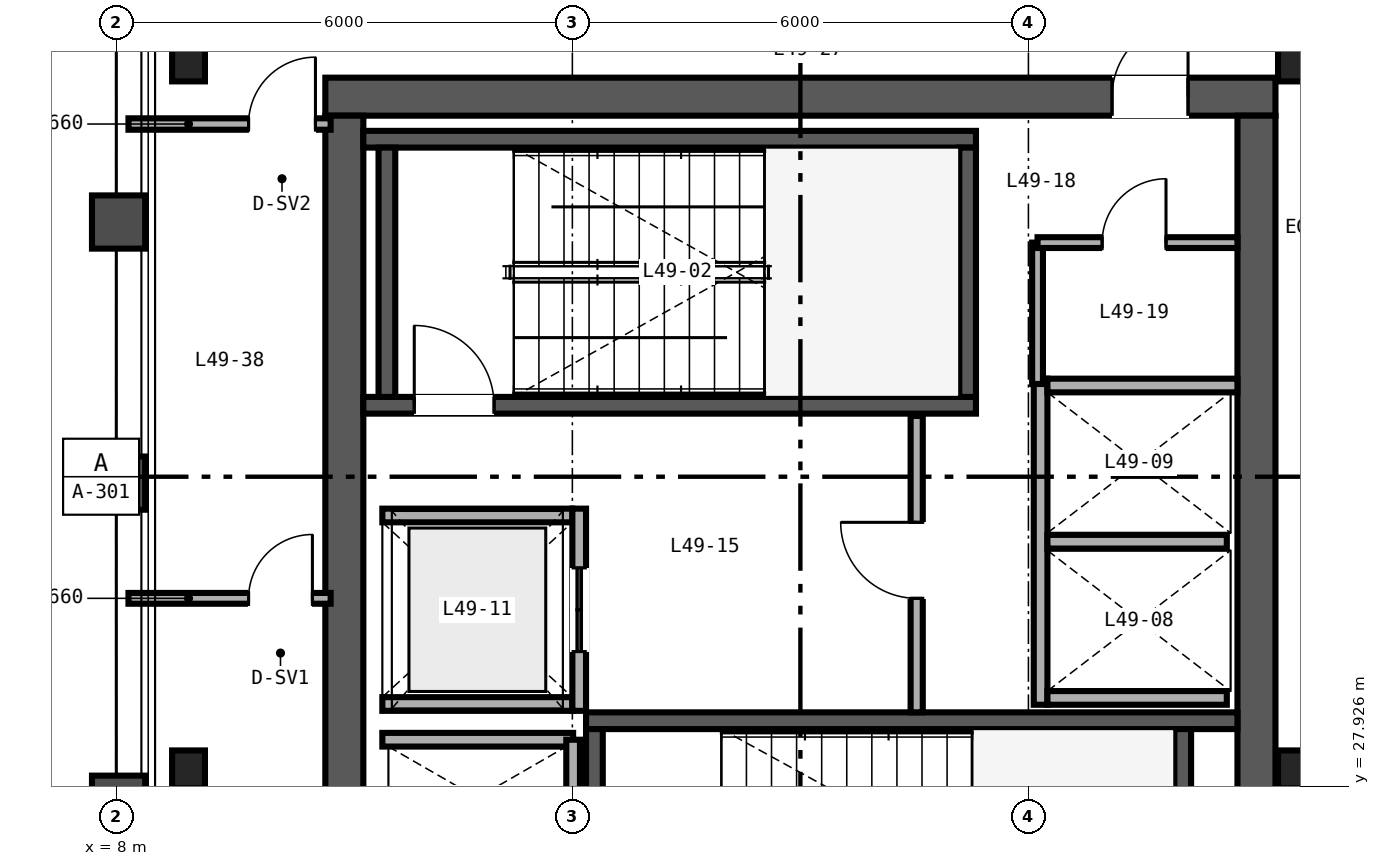
"""IFC4 building model, lengths in metres.
Left out: names, types, materials, properties, quantities, classifications, styles, units other than length and angle.
Written with IfcOpenShell. Run it as: python <this file> out.ifc"""

import sys

from ifc_helpers import new_model, si_unit, direction, frame, frame_2d, origin, origin_2d, place, context, subcontext, project, spatial, rectangle, i_section, extrude, source, transform, mapped, element, fill, save


model = new_model("IFC4")
c1 = context("Model", 3, precision=1e-05, world=origin(), true_north=direction((0.0, 1.0)))
c2 = subcontext(c1, "Body", "Model", "MODEL_VIEW")
j1 = project(units=[si_unit("LENGTHUNIT", "METRE"), si_unit("PLANEANGLEUNIT", "RADIAN")], contexts=[c1])
p1 = place(None, origin())
s1 = spatial("IfcSite", under=j1, at=p1, CompositionType="ELEMENT")
p2 = place(p1, origin())
s2 = spatial("IfcBuilding", under=s1, at=p2, CompositionType="ELEMENT")
p3 = place(p2, frame((0.0, 0.0, 195.6)))
s3 = spatial("IfcBuildingStorey", under=s2, at=p3, CompositionType="ELEMENT", Elevation=195.6)
p4 = place(p3, frame((10.75, 37.0, 0.0), z_axis=(0.0, 0.0, 1.0), x_axis=(1.0, 0.0, 0.0)))
e1 = element("IfcWall", 1, at=p4, inside=s3, PredefinedType="SHEAR", context=c2, shape_type="SweptSolid", body=[
    extrude(rectangle(XDim=12.5, YDim=0.5, at=frame_2d((6.25, 0.0))), origin(), (0.0, 0.0, 1.0), 3.37),
])
p5 = place(p4, frame((10.35, 0.0, 0.0)))
e2 = element("IfcOpeningElement", 2, at=p5, cuts=e1, PredefinedType="OPENING", context=c2, shape_type="SweptSolid", body=[
    extrude(rectangle(XDim=1.0, YDim=2.15, at=frame_2d((0.5, 1.075))), frame((0.0, 0.26, 0.0), z_axis=(0.0, -1.0, 0.0), x_axis=(1.0, 0.0, 0.0)), (0.0, 0.0, 1.0), 0.52),
])
for number, where, z_axis, x_axis in (
    (3, (11.0, 15.25, 0.0), (0.0, 0.0, 1.0), (0.0, 1.0, 0.0)),
    (4, (23.0, 15.25, 0.0), (0.0, 0.0, 1.0), (0.0, 1.0, 0.0)),
):
    element("IfcWall", number, at=place(p3, frame(where, z_axis=z_axis, x_axis=x_axis)), inside=s3, PredefinedType="SHEAR", context=c2, shape_type="SweptSolid", body=[
        extrude(rectangle(XDim=21.5, YDim=0.5, at=frame_2d((10.75, 0.0))), origin(), (0.0, 0.0, 1.0), 3.37),
    ])
p6 = place(p3, frame((11.25, 32.94, 0.0), z_axis=(0.0, 0.0, 1.0), x_axis=(1.0, 0.0, 0.0)))
e5 = element("IfcWall", 5, at=p6, inside=s3, PredefinedType="SHEAR", context=c2, shape_type="SweptSolid", body=[
    extrude(rectangle(XDim=8.06, YDim=0.22, at=frame_2d((4.03, 0.0))), origin(), (0.0, 0.0, 1.0), 3.4),
])
p7 = place(p6, frame((0.67, 0.0, 0.0)))
e6 = element("IfcOpeningElement", 6, at=p7, cuts=e5, PredefinedType="OPENING", context=c2, shape_type="SweptSolid", body=[
    extrude(rectangle(XDim=1.05, YDim=2.15, at=frame_2d((0.525, 1.075))), frame((0.0, 0.12, 0.0), z_axis=(0.0, -1.0, 0.0), x_axis=(1.0, 0.0, 0.0)), (0.0, 0.0, 1.0), 0.24),
])
p8 = place(p3, frame((11.25, 36.44, 0.0), z_axis=(0.0, 0.0, 1.0), x_axis=(1.0, 0.0, 0.0)))
e7 = element("IfcWall", 7, at=p8, inside=s3, PredefinedType="SHEAR", context=c2, shape_type="SweptSolid", body=[
    extrude(rectangle(XDim=8.06, YDim=0.22, at=frame_2d((4.03, 0.0))), origin(), (0.0, 0.0, 1.0), 3.4),
])
for number, where, z_axis, x_axis in (
    (8, (11.56, 33.05, 0.0), (0.0, 0.0, 1.0), (0.0, 1.0, 0.0)),
    (9, (19.2, 33.05, 0.0), (0.0, 0.0, 1.0), (0.0, 1.0, 0.0)),
):
    element("IfcWall", number, at=place(p3, frame(where, z_axis=z_axis, x_axis=x_axis)), inside=s3, PredefinedType="SHEAR", context=c2, shape_type="SweptSolid", body=[
        extrude(rectangle(XDim=3.28, YDim=0.22, at=frame_2d((1.64, 0.0))), origin(), (0.0, 0.0, 1.0), 3.4),
    ])
p9 = place(p3, frame((14.18, 28.79, 0.0), z_axis=(0.0, 0.0, 1.0), x_axis=(1.0, 0.0, 0.0)))
e10 = element("IfcWall", 10, at=p9, inside=s3, PredefinedType="SHEAR", context=c2, shape_type="SweptSolid", body=[
    extrude(rectangle(XDim=8.57, YDim=0.22, at=frame_2d((4.285, 0.0))), origin(), (0.0, 0.0, 1.0), 3.4),
])
for number, where, z_axis, x_axis in (
    (11, (14.29, 25.4, 0.0), (0.0, 0.0, 1.0), (0.0, 1.0, 0.0)),
    (12, (22.03, 25.4, 0.0), (0.0, 0.0, 1.0), (0.0, 1.0, 0.0)),
):
    element("IfcWall", number, at=place(p3, frame(where, z_axis=z_axis, x_axis=x_axis)), inside=s3, PredefinedType="SHEAR", context=c2, shape_type="SweptSolid", body=[
        extrude(rectangle(XDim=3.28, YDim=0.22, at=frame_2d((1.64, 0.0))), origin(), (0.0, 0.0, 1.0), 3.4),
    ])
m1 = source(origin(), c2, "Body", "SweptSolid", [
    extrude(i_section(OverallWidth=0.432, OverallDepth=0.498, WebThickness=0.056, FlangeThickness=0.089, FilletRadius=0.025, at=origin_2d()), origin(), (0.0, 0.0, 1.0), 3.37),
])
for number, where, z_axis, x_axis in (
    (13, (8.95, 28.15, 0.0), (0.0, 0.0, 1.0), (1.0, 0.0, 0.0)),
    (14, (23.5, 28.15, 0.0), (0.0, 0.0, 1.0), (1.0, 0.0, 0.0)),
    (15, (8.95, 37.45, 0.0), (0.0, 0.0, 1.0), (1.0, 0.0, 0.0)),
    (16, (23.5, 37.45, 0.0), (0.0, 0.0, 1.0), (1.0, 0.0, 0.0)),
):
    element("IfcColumn", number, at=place(p3, frame(where, z_axis=z_axis, x_axis=x_axis)), inside=s3, PredefinedType="COLUMN", context=c2, shape_type="MappedRepresentation", body=[
        mapped(m1, transform((0.0, 0.0, 0.0), scale=1.0)),
    ])
p10 = place(p3, frame((20.16, 29.0, 0.0), z_axis=(0.0, 0.0, 1.0), x_axis=(0.0, 1.0, 0.0)))
e17 = element("IfcWall", 17, at=p10, inside=s3, PredefinedType="SOLIDWALL", context=c2, shape_type="SweptSolid", body=[
    extrude(rectangle(XDim=4.29, YDim=0.18, at=frame_2d((2.145, 0.0))), origin(), (0.0, 0.0, 1.0), 3.37),
])
p11 = place(p3, frame((20.25, 29.09, 0.0), z_axis=(0.0, 0.0, 1.0), x_axis=(1.0, 0.0, 0.0)))
e18 = element("IfcWall", 18, at=p11, inside=s3, PredefinedType="SOLIDWALL", context=c2, shape_type="SweptSolid", body=[
    extrude(rectangle(XDim=2.36, YDim=0.18, at=frame_2d((1.18, 0.0))), origin(), (0.0, 0.0, 1.0), 3.37),
])
p12 = place(p3, frame((20.25, 33.2, 0.0), z_axis=(0.0, 0.0, 1.0), x_axis=(1.0, 0.0, 0.0)))
e19 = element("IfcWall", 19, at=p12, inside=s3, PredefinedType="SOLIDWALL", context=c2, shape_type="SweptSolid", body=[
    extrude(rectangle(XDim=2.5, YDim=0.18, at=frame_2d((1.25, 0.0))), origin(), (0.0, 0.0, 1.0), 3.37),
])
p13 = place(p3, frame((20.25, 31.145, 0.0), z_axis=(0.0, 0.0, 1.0), x_axis=(1.0, 0.0, 0.0)))
e20 = element("IfcWall", 20, at=p13, inside=s3, PredefinedType="SOLIDWALL", context=c2, shape_type="SweptSolid", body=[
    extrude(rectangle(XDim=2.36, YDim=0.18, at=frame_2d((1.18, 0.0))), origin(), (0.0, 0.0, 1.0), 3.37),
])
for number, where, z_axis, x_axis in (
    (21, (11.5, 29.01, 0.0), (0.0, 0.0, 1.0), (1.0, 0.0, 0.0)),
    (22, (11.5, 31.49, 0.0), (0.0, 0.0, 1.0), (1.0, 0.0, 0.0)),
):
    element("IfcWall", number, at=place(p3, frame(where, z_axis=z_axis, x_axis=x_axis)), inside=s3, PredefinedType="SOLIDWALL", context=c2, shape_type="SweptSolid", body=[
        extrude(rectangle(XDim=2.5, YDim=0.18, at=frame_2d((1.25, 0.0))), origin(), (0.0, 0.0, 1.0), 3.37),
    ])
p14 = place(p3, frame((14.09, 28.92, 0.0), z_axis=(0.0, 0.0, 1.0), x_axis=(0.0, 1.0, 0.0)))
e23 = element("IfcWall", 23, at=p14, inside=s3, PredefinedType="SOLIDWALL", context=c2, shape_type="SweptSolid", body=[
    extrude(rectangle(XDim=2.66, YDim=0.18, at=frame_2d((1.33, 0.0))), origin(), (0.0, 0.0, 1.0), 3.37),
])
p15 = place(p14, frame((0.78, 0.0, 0.0)))
e24 = element("IfcOpeningElement", 24, at=p15, cuts=e23, PredefinedType="OPENING", context=c2, shape_type="SweptSolid", body=[
    extrude(rectangle(XDim=1.1, YDim=2.2, at=frame_2d((0.55, 1.1))), frame((0.0, 0.1, 0.0), z_axis=(0.0, -1.0, 0.0), x_axis=(1.0, 0.0, 0.0)), (0.0, 0.0, 1.0), 0.2),
])
p16 = place(p3, frame((11.5, 28.54, 0.0), z_axis=(0.0, 0.0, 1.0), x_axis=(1.0, 0.0, 0.0)))
e25 = element("IfcWall", 25, at=p16, inside=s3, PredefinedType="SOLIDWALL", context=c2, shape_type="SweptSolid", body=[
    extrude(rectangle(XDim=2.51, YDim=0.18, at=frame_2d((1.255, 0.0))), origin(), (0.0, 0.0, 1.0), 3.37),
])
p17 = place(p3, frame((14.01, 25.46, 0.0), z_axis=(0.0, 0.0, 1.0), x_axis=(0.0, 1.0, 0.0)))
e26 = element("IfcWall", 26, at=p17, inside=s3, PredefinedType="SOLIDWALL", context=c2, shape_type="SweptSolid", body=[
    extrude(rectangle(XDim=3.08, YDim=0.18, at=frame_2d((1.54, 0.0))), origin(), (0.0, 0.0, 1.0), 3.37),
])
p18 = place(p3, frame((18.53, 28.9, 0.0), z_axis=(0.0, 0.0, 1.0), x_axis=(0.0, 1.0, 0.0)))
e27 = element("IfcWall", 27, at=p18, inside=s3, PredefinedType="PARTITIONING", context=c2, shape_type="SweptSolid", body=[
    extrude(rectangle(XDim=3.9, YDim=0.16, at=frame_2d((1.95, 0.0))), origin(), (0.0, 0.0, 1.0), 3.37),
])
p19 = place(p18, frame((1.5, 0.0, 0.0)))
e28 = element("IfcOpeningElement", 28, at=p19, cuts=e27, PredefinedType="OPENING", context=c2, shape_type="SweptSolid", body=[
    extrude(rectangle(XDim=1.0, YDim=2.15, at=frame_2d((0.5, 1.075))), frame((0.0, 0.09, 0.0), z_axis=(0.0, -1.0, 0.0), x_axis=(1.0, 0.0, 0.0)), (0.0, 0.0, 1.0), 0.18),
])
p20 = place(p3, frame((20.12, 33.22, 0.0), z_axis=(0.0, 0.0, 1.0), x_axis=(0.0, 1.0, 0.0)))
e29 = element("IfcWall", 29, at=p20, inside=s3, PredefinedType="PARTITIONING", context=c2, shape_type="SweptSolid", body=[
    extrude(rectangle(XDim=1.86, YDim=0.142, at=frame_2d((0.93, 0.0))), origin(), (0.0, 0.0, 1.0), 3.37),
])
p21 = place(p3, frame((20.12, 35.08, 0.0), z_axis=(0.0, 0.0, 1.0), x_axis=(1.0, 0.0, 0.0)))
e30 = element("IfcWall", 30, at=p21, inside=s3, PredefinedType="PARTITIONING", context=c2, shape_type="SweptSolid", body=[
    extrude(rectangle(XDim=2.63, YDim=0.142, at=frame_2d((1.315, 0.0))), origin(), (0.0, 0.0, 1.0), 3.37),
])
p22 = place(p21, frame((0.85, 0.0, 0.0)))
e31 = element("IfcOpeningElement", 31, at=p22, cuts=e30, PredefinedType="OPENING", context=c2, shape_type="SweptSolid", body=[
    extrude(rectangle(XDim=0.84, YDim=2.1, at=frame_2d((0.42, 1.05))), frame((0.0, 0.081, 0.0), z_axis=(0.0, -1.0, 0.0), x_axis=(1.0, 0.0, 0.0)), (0.0, 0.0, 1.0), 0.162),
])
p23 = place(p3, frame((8.16, 36.64, 0.0), z_axis=(0.0, 0.0, 1.0), x_axis=(1.0, 0.0, 0.0)))
e32 = element("IfcWall", 32, at=p23, inside=s3, PredefinedType="PARTITIONING", context=c2, shape_type="SweptSolid", body=[
    extrude(rectangle(XDim=2.66, YDim=0.15, at=frame_2d((1.33, 0.0))), origin(), (0.0, 0.0, 1.0), 2.753),
])
p24 = place(p23, frame((1.58, 0.0, 0.0)))
e33 = element("IfcOpeningElement", 33, at=p24, cuts=e32, PredefinedType="OPENING", context=c2, shape_type="SweptSolid", body=[
    extrude(rectangle(XDim=0.88, YDim=2.15, at=frame_2d((0.44, 1.075))), frame((0.0, 0.085, 0.0), z_axis=(0.0, -1.0, 0.0), x_axis=(1.0, 0.0, 0.0)), (0.0, 0.0, 1.0), 0.17),
])
p25 = place(p3, frame((8.16, 30.4, 0.0), z_axis=(0.0, 0.0, 1.0), x_axis=(1.0, 0.0, 0.0)))
e34 = element("IfcWall", 34, at=p25, inside=s3, PredefinedType="PARTITIONING", context=c2, shape_type="SweptSolid", body=[
    extrude(rectangle(XDim=2.66, YDim=0.142, at=frame_2d((1.33, 0.0))), origin(), (0.0, 0.0, 1.0), 2.753),
])
p26 = place(p25, frame((1.58, 0.0, 0.0)))
e35 = element("IfcOpeningElement", 35, at=p26, cuts=e34, PredefinedType="OPENING", context=c2, shape_type="SweptSolid", body=[
    extrude(rectangle(XDim=0.84, YDim=2.1, at=frame_2d((0.42, 1.05))), frame((0.0, 0.081, 0.0), z_axis=(0.0, -1.0, 0.0), x_axis=(1.0, 0.0, 0.0)), (0.0, 0.0, 1.0), 0.162),
])
m2 = source(origin(), c2, "Body", "SweptSolid", [
    extrude(rectangle(XDim=1.05, YDim=2.15, at=frame_2d((0.525, 1.075))), frame((0.0, 0.025, 0.0), z_axis=(0.0, -1.0, 0.0), x_axis=(1.0, 0.0, 0.0)), (0.0, 0.0, 1.0), 0.05),
])
p27 = place(p7, origin())
e36 = element("IfcDoor", 36, at=p27, inside=s3, OperationType="SINGLE_SWING_LEFT", PredefinedType="DOOR", context=c2, shape_type="MappedRepresentation", body=[
    mapped(m2, transform((0.0, 0.0, 0.0), scale=1.0)),
])
fill(e6, e36)
m3 = source(origin(), c2, "Body", "SweptSolid", [
    extrude(rectangle(XDim=1.1, YDim=2.2, at=frame_2d((0.55, 1.1))), frame((0.0, 0.025, 0.0), z_axis=(0.0, -1.0, 0.0), x_axis=(1.0, 0.0, 0.0)), (0.0, 0.0, 1.0), 0.05),
])
p28 = place(p15, origin())
e37 = element("IfcDoor", 37, at=p28, inside=s3, OperationType="DOUBLE_DOOR_SLIDING", PredefinedType="DOOR", context=c2, shape_type="MappedRepresentation", body=[
    mapped(m3, transform((0.0, 0.0, 0.0), scale=1.0)),
])
fill(e24, e37)
m4 = source(origin(), c2, "Body", "SweptSolid", [
    extrude(rectangle(XDim=1.0, YDim=2.15, at=frame_2d((0.5, 1.075))), frame((0.0, 0.025, 0.0), z_axis=(0.0, -1.0, 0.0), x_axis=(1.0, 0.0, 0.0)), (0.0, 0.0, 1.0), 0.05),
])
p29 = place(p19, origin())
e38 = element("IfcDoor", 38, at=p29, inside=s3, OperationType="SINGLE_SWING_RIGHT", PredefinedType="DOOR", context=c2, shape_type="MappedRepresentation", body=[
    mapped(m4, transform((0.0, 0.0, 0.0), scale=1.0)),
])
fill(e28, e38)
m5 = source(origin(), c2, "Body", "SweptSolid", [
    extrude(rectangle(XDim=0.84, YDim=2.1, at=frame_2d((0.42, 1.05))), frame((0.0, 0.025, 0.0), z_axis=(0.0, -1.0, 0.0), x_axis=(1.0, 0.0, 0.0)), (0.0, 0.0, 1.0), 0.05),
])
p30 = place(p22, origin())
e39 = element("IfcDoor", 39, at=p30, inside=s3, OperationType="SINGLE_SWING_RIGHT", PredefinedType="DOOR", context=c2, shape_type="MappedRepresentation", body=[
    mapped(m5, transform((0.0, 0.0, 0.0), scale=1.0)),
])
fill(e31, e39)
p31 = place(p5, origin())
e40 = element("IfcDoor", 40, at=p31, inside=s3, OperationType="SINGLE_SWING_RIGHT", PredefinedType="DOOR", context=c2, shape_type="MappedRepresentation", body=[
    mapped(m4, transform((0.0, 0.0, 0.0), scale=1.0)),
])
fill(e2, e40)
m6 = source(origin(), c2, "Body", "SweptSolid", [
    extrude(rectangle(XDim=0.88, YDim=2.15, at=frame_2d((0.44, 1.075))), frame((0.0, 0.025, 0.0), z_axis=(0.0, -1.0, 0.0), x_axis=(1.0, 0.0, 0.0)), (0.0, 0.0, 1.0), 0.05),
])
p32 = place(p24, origin())
e41 = element("IfcDoor", 41, at=p32, inside=s3, OperationType="SINGLE_SWING_RIGHT", PredefinedType="DOOR", context=c2, shape_type="MappedRepresentation", body=[
    mapped(m6, transform((0.0, 0.0, 0.0), scale=1.0)),
])
fill(e33, e41)
p33 = place(p26, origin())
e42 = element("IfcDoor", 42, at=p33, inside=s3, OperationType="SINGLE_SWING_RIGHT", PredefinedType="DOOR", context=c2, shape_type="MappedRepresentation", body=[
    mapped(m5, transform((0.0, 0.0, 0.0), scale=1.0)),
])
fill(e35, e42)
save(model, sys.argv[1])
